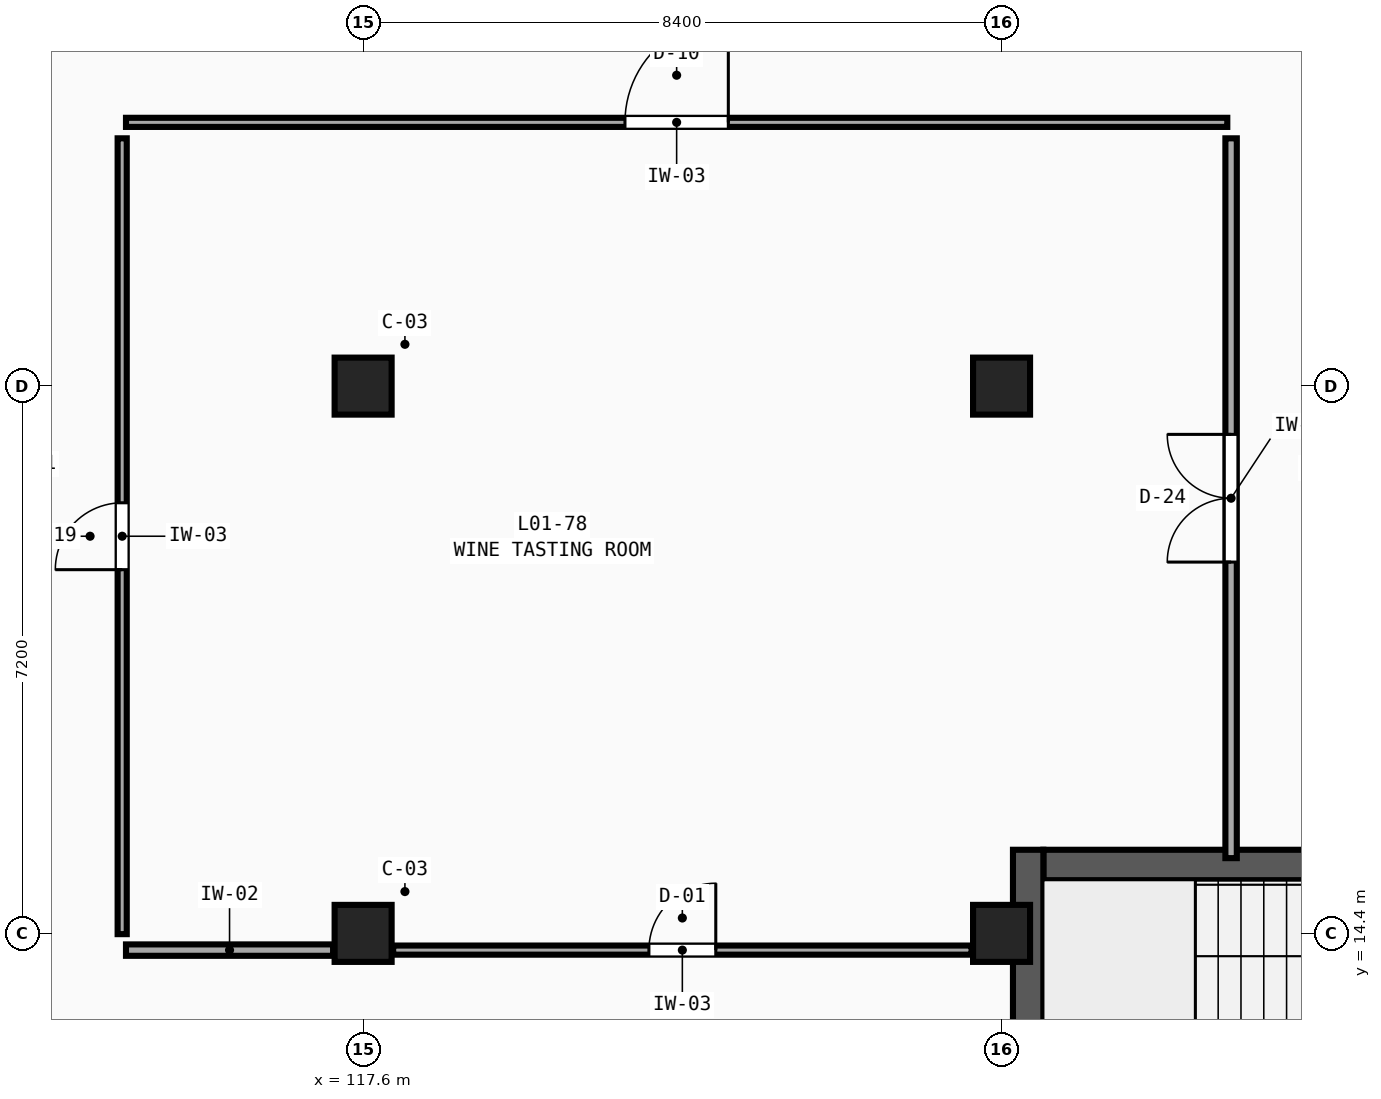
"""IFC4 building model, lengths in metres.
Left out: names, types, materials, properties, quantities, classifications, styles, units other than length and angle.
Written with IfcOpenShell. Run it as: python <this file> out.ifc"""

import sys

from ifc_helpers import new_model, si_unit, direction, frame, frame_2d, origin, origin_2d, place, context, subcontext, project, spatial, rectangle, extrude, element, fill, save


model = new_model("IFC4")
c1 = context("Model", 3, precision=1e-05, world=origin(), true_north=direction((0.0, 1.0)))
c2 = subcontext(c1, "Body", "Model", "MODEL_VIEW")
j1 = project(units=[si_unit("LENGTHUNIT", "METRE"), si_unit("PLANEANGLEUNIT", "RADIAN")], contexts=[c1])
p1 = place(None, origin())
s1 = spatial("IfcSite", under=j1, at=p1, CompositionType="ELEMENT")
p2 = place(p1, origin())
s2 = spatial("IfcBuilding", under=s1, at=p2, CompositionType="ELEMENT")
p3 = place(p2, frame((0.0, 0.0, 5.4)))
s3 = spatial("IfcBuildingStorey", under=s2, at=p3, CompositionType="ELEMENT", Elevation=5.4)
for number, where, z_axis, x_axis in (
    (1, (117.6, 14.4, 0.0), (0.0, 0.0, 1.0), (1.0, 0.0, 0.0)),
    (2, (117.6, 21.6, 0.0), (0.0, 0.0, 1.0), (1.0, 0.0, 0.0)),
    (3, (126.0, 14.4, 0.0), (0.0, 0.0, 1.0), (1.0, 0.0, 0.0)),
    (4, (126.0, 21.6, 0.0), (0.0, 0.0, 1.0), (1.0, 0.0, 0.0)),
):
    element("IfcColumn", number, at=place(p3, frame(where, z_axis=z_axis, x_axis=x_axis)), inside=s3, PredefinedType="COLUMN", context=c2, shape_type="SweptSolid", body=[
        extrude(rectangle(XDim=0.75, YDim=0.75, at=origin_2d()), origin(), (0.0, 0.0, 1.0), 4.5),
    ])
p4 = place(p3, frame((126.55, 15.3, 0.0), z_axis=(0.0, 0.0, 1.0), x_axis=(1.0, 0.0, 0.0)))
e5 = element("IfcWall", 5, at=p4, inside=s3, PredefinedType="SHEAR", context=c2, shape_type="SweptSolid", body=[
    extrude(rectangle(XDim=7.3, YDim=0.4, at=frame_2d((3.65, 0.0))), origin(), (0.0, 0.0, 1.0), 4.5),
])
p5 = place(p3, frame((126.35, 15.5, 0.0), z_axis=(0.0, 0.0, 1.0), x_axis=(0.0, -1.0, 0.0)))
e6 = element("IfcWall", 6, at=p5, inside=s3, PredefinedType="SHEAR", context=c2, shape_type="SweptSolid", body=[
    extrude(rectangle(XDim=8.25, YDim=0.4, at=frame_2d((4.125, 0.0))), origin(), (0.0, 0.0, 1.0), 4.5),
])
p6 = place(p3, frame((114.48, 25.07, 0.0), z_axis=(0.0, 0.0, 1.0), x_axis=(1.0, 0.0, 0.0)))
e7 = element("IfcWall", 7, at=p6, inside=s3, PredefinedType="PARTITIONING", context=c2, shape_type="SweptSolid", body=[
    extrude(rectangle(XDim=14.49, YDim=0.12, at=frame_2d((7.245, 0.0))), origin(), (0.0, 0.0, 1.0), 4.18),
])
p7 = place(p6, frame((6.565, 0.0, 0.0)))
e8 = element("IfcOpeningElement", 8, at=p7, cuts=e7, PredefinedType="OPENING", context=c2, shape_type="SweptSolid", body=[
    extrude(rectangle(XDim=1.36, YDim=2.13, at=frame_2d((0.68, 1.065))), frame((0.0, 0.08, 0.0), z_axis=(0.0, -1.0, 0.0), x_axis=(1.0, 0.0, 0.0)), (0.0, 0.0, 1.0), 0.16),
])
p8 = place(p3, frame((114.48, 14.18, 0.0), z_axis=(0.0, 0.0, 1.0), x_axis=(1.0, 0.0, 0.0)))
e9 = element("IfcWall", 9, at=p8, inside=s3, PredefinedType="PARTITIONING", context=c2, shape_type="SweptSolid", body=[
    extrude(rectangle(XDim=2.725, YDim=0.15, at=frame_2d((1.363, 0.0))), origin(), (0.0, 0.0, 1.0), 3.73),
])
p9 = place(p3, frame((117.995, 14.18, 0.0), z_axis=(0.0, 0.0, 1.0), x_axis=(1.0, 0.0, 0.0)))
e10 = element("IfcWall", 10, at=p9, inside=s3, PredefinedType="PARTITIONING", context=c2, shape_type="SweptSolid", body=[
    extrude(rectangle(XDim=7.61, YDim=0.12, at=frame_2d((3.805, 0.0))), origin(), (0.0, 0.0, 1.0), 3.73),
])
p10 = place(p9, frame((3.365, 0.0, 0.0)))
e11 = element("IfcOpeningElement", 11, at=p10, cuts=e10, PredefinedType="OPENING", context=c2, shape_type="SweptSolid", body=[
    extrude(rectangle(XDim=0.88, YDim=2.05, at=frame_2d((0.44, 1.025))), frame((0.0, 0.08, 0.0), z_axis=(0.0, -1.0, 0.0), x_axis=(1.0, 0.0, 0.0)), (0.0, 0.0, 1.0), 0.16),
])
p11 = place(p3, frame((114.43, 14.39, 0.0), z_axis=(0.0, 0.0, 1.0), x_axis=(0.0, 1.0, 0.0)))
e12 = element("IfcWall", 12, at=p11, inside=s3, PredefinedType="PARTITIONING", context=c2, shape_type="SweptSolid", body=[
    extrude(rectangle(XDim=10.47, YDim=0.12, at=frame_2d((5.235, 0.0))), origin(), (0.0, 0.0, 1.0), 4.18),
])
p12 = place(p11, frame((4.795, 0.0, 0.0)))
e13 = element("IfcOpeningElement", 13, at=p12, cuts=e12, PredefinedType="OPENING", context=c2, shape_type="SweptSolid", body=[
    extrude(rectangle(XDim=0.88, YDim=2.29, at=frame_2d((0.44, 1.145))), frame((0.0, 0.08, 0.0), z_axis=(0.0, -1.0, 0.0), x_axis=(1.0, 0.0, 0.0)), (0.0, 0.0, 1.0), 0.16),
])
p13 = place(p3, frame((129.02, 15.39, 0.0), z_axis=(0.0, 0.0, 1.0), x_axis=(0.0, 1.0, 0.0)))
e14 = element("IfcWall", 14, at=p13, inside=s3, PredefinedType="PARTITIONING", context=c2, shape_type="SweptSolid", body=[
    extrude(rectangle(XDim=9.47, YDim=0.15, at=frame_2d((4.735, 0.0))), origin(), (0.0, 0.0, 1.0), 4.18),
])
p14 = place(p13, frame((3.895, 0.0, 0.0)))
e15 = element("IfcOpeningElement", 15, at=p14, cuts=e14, PredefinedType="OPENING", context=c2, shape_type="SweptSolid", body=[
    extrude(rectangle(XDim=1.68, YDim=2.29, at=frame_2d((0.84, 1.145))), frame((0.0, 0.095, 0.0), z_axis=(0.0, -1.0, 0.0), x_axis=(1.0, 0.0, 0.0)), (0.0, 0.0, 1.0), 0.19),
])
p15 = place(p7, origin())
e16 = element("IfcDoor", 16, at=p15, inside=s3, OperationType="SINGLE_SWING_RIGHT", PredefinedType="DOOR", context=c2, shape_type="SweptSolid", body=[
    extrude(rectangle(XDim=1.36, YDim=2.13, at=frame_2d((0.68, 1.065))), frame((0.0, 0.025, 0.0), z_axis=(0.0, -1.0, 0.0), x_axis=(1.0, 0.0, 0.0)), (0.0, 0.0, 1.0), 0.05),
])
fill(e8, e16)
p16 = place(p10, origin())
e17 = element("IfcDoor", 17, at=p16, inside=s3, OperationType="SINGLE_SWING_RIGHT", PredefinedType="DOOR", context=c2, shape_type="SweptSolid", body=[
    extrude(rectangle(XDim=0.88, YDim=2.05, at=frame_2d((0.44, 1.025))), frame((0.0, 0.025, 0.0), z_axis=(0.0, -1.0, 0.0), x_axis=(1.0, 0.0, 0.0)), (0.0, 0.0, 1.0), 0.05),
])
fill(e11, e17)
p17 = place(p12, origin())
e18 = element("IfcDoor", 18, at=p17, inside=s3, OperationType="SINGLE_SWING_LEFT", PredefinedType="DOOR", context=c2, shape_type="SweptSolid", body=[
    extrude(rectangle(XDim=0.88, YDim=2.29, at=frame_2d((0.44, 1.145))), frame((0.0, 0.025, 0.0), z_axis=(0.0, -1.0, 0.0), x_axis=(1.0, 0.0, 0.0)), (0.0, 0.0, 1.0), 0.05),
])
fill(e13, e18)
p18 = place(p14, origin())
e19 = element("IfcDoor", 19, at=p18, inside=s3, OperationType="DOUBLE_DOOR_SINGLE_SWING", PredefinedType="DOOR", context=c2, shape_type="SweptSolid", body=[
    extrude(rectangle(XDim=1.68, YDim=2.29, at=frame_2d((0.84, 1.145))), frame((0.0, 0.025, 0.0), z_axis=(0.0, -1.0, 0.0), x_axis=(1.0, 0.0, 0.0)), (0.0, 0.0, 1.0), 0.05),
])
fill(e15, e19)
save(model, sys.argv[1])
